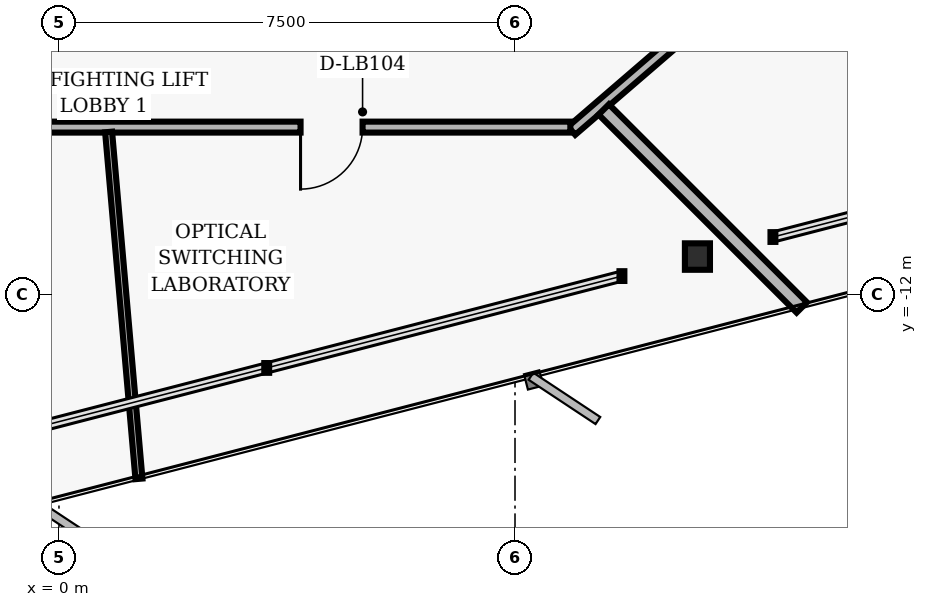
"""IFC4 building model, lengths in metres.
Left out: names, types, materials, properties, quantities, classifications, styles, units other than length and angle.
Written with IfcOpenShell. Run it as: python <this file> out.ifc"""

import sys

from ifc_helpers import new_model, si_unit, direction, frame, frame_2d, origin, origin_2d, place, context, subcontext, project, spatial, rectangle, i_section, extrude, element, fill, save


model = new_model("IFC4")
c1 = context("Model", 3, precision=1e-05, world=origin(), true_north=direction((0.0, 1.0)))
c2 = subcontext(c1, "Body", "Model", "MODEL_VIEW")
j1 = project(units=[si_unit("LENGTHUNIT", "METRE"), si_unit("PLANEANGLEUNIT", "RADIAN")], contexts=[c1])
p1 = place(None, origin())
s1 = spatial("IfcSite", under=j1, at=p1, CompositionType="ELEMENT")
p2 = place(p1, origin())
s2 = spatial("IfcBuilding", under=s1, at=p2, CompositionType="ELEMENT")
p3 = place(p2, frame((0.0, 0.0, 94.72)))
s3 = spatial("IfcBuildingStorey", under=s2, at=p3, CompositionType="ELEMENT", Elevation=94.72)
p4 = place(p3, frame((10.5, -11.379, 0.0), z_axis=(0.0, 0.0, 1.0), x_axis=(1.0, 0.0, 0.0)))
e1 = element("IfcColumn", 1, at=p4, inside=s3, PredefinedType="COLUMN", context=c2, shape_type="SweptSolid", body=[
    extrude(i_section(OverallWidth=0.412, OverallDepth=0.435, WebThickness=0.036, FlangeThickness=0.057, FilletRadius=0.022, at=origin_2d()), origin(), (0.0, 0.0, 1.0), 3.04),
])
p5 = place(p3, frame((13.268, -5.141, 0.0), z_axis=(0.0, 0.0, 1.0), x_axis=(-0.757534501725, -0.65279512766, 0.0)))
e2 = element("IfcWall", 2, at=p5, inside=s3, PredefinedType="PARTITIONING", context=c2, shape_type="SweptSolid", body=[
    extrude(rectangle(XDim=6.385, YDim=0.18, at=frame_2d((3.192, 0.0))), origin(), (0.0, 0.0, 1.0), 2.763),
])
p6 = place(p5, frame((2.418, 0.0, 0.0)))
e3 = element("IfcOpeningElement", 3, at=p6, cuts=e2, PredefinedType="OPENING", context=c2, shape_type="SweptSolid", body=[
    extrude(rectangle(XDim=1.18, YDim=2.02, at=frame_2d((0.59, 1.01))), frame((0.0, 0.1, 0.0), z_axis=(0.0, -1.0, 0.0), x_axis=(1.0, 0.0, 0.0)), (0.0, 0.0, 1.0), 0.2),
])
p7 = place(p3, frame((8.41, -9.25, 0.0), z_axis=(0.0, 0.0, 1.0), x_axis=(-1.0, 0.0, 0.0)))
e4 = element("IfcWall", 4, at=p7, inside=s3, PredefinedType="PARTITIONING", context=c2, shape_type="SweptSolid", body=[
    extrude(rectangle(XDim=17.0, YDim=0.18, at=frame_2d((8.5, 0.0))), origin(), (0.0, 0.0, 1.0), 2.277),
])
p8 = place(p7, frame((10.795, 0.0, 0.0)))
e5 = element("IfcOpeningElement", 5, at=p8, cuts=e4, PredefinedType="OPENING", context=c2, shape_type="SweptSolid", body=[
    extrude(rectangle(XDim=0.96, YDim=2.02, at=frame_2d((0.48, 1.01))), frame((0.0, 0.1, 0.0), z_axis=(0.0, -1.0, 0.0), x_axis=(1.0, 0.0, 0.0)), (0.0, 0.0, 1.0), 0.2),
])
p9 = place(p7, frame((3.417, 0.0, 0.0)))
e6 = element("IfcOpeningElement", 6, at=p9, cuts=e4, PredefinedType="OPENING", context=c2, shape_type="SweptSolid", body=[
    extrude(rectangle(XDim=1.02, YDim=2.02, at=frame_2d((0.51, 1.01))), frame((0.0, 0.1, 0.0), z_axis=(0.0, -1.0, 0.0), x_axis=(1.0, 0.0, 0.0)), (0.0, 0.0, 1.0), 0.2),
])
p10 = place(p3, frame((0.816, -9.33, 0.0), z_axis=(0.0, 0.0, 1.0), x_axis=(0.087137335428, -0.996196308352, 0.0)))
e7 = element("IfcWall", 7, at=p10, inside=s3, PredefinedType="MOVABLE", context=c2, shape_type="SweptSolid", body=[
    extrude(rectangle(XDim=5.727, YDim=0.115, at=frame_2d((2.863, 0.0))), origin(), (0.0, 0.0, 1.0), 2.763),
])
p11 = place(p3, frame((8.96, -8.96, 0.0), z_axis=(0.0, 0.0, 1.0), x_axis=(0.707106781187, -0.707106781187, 0.0)))
e8 = element("IfcWall", 8, at=p11, inside=s3, PredefinedType="PARTITIONING", context=c2, shape_type="SweptSolid", body=[
    extrude(rectangle(XDim=4.605, YDim=0.24, at=frame_2d((2.303, 0.0))), origin(), (0.0, 0.0, 1.0), 2.763),
])
p12 = place(p9, origin())
e9 = element("IfcDoor", 9, at=p12, inside=s3, OperationType="SINGLE_SWING_RIGHT", PredefinedType="DOOR", context=c2, shape_type="SweptSolid", body=[
    extrude(rectangle(XDim=1.02, YDim=2.02, at=frame_2d((0.51, 1.01))), frame((0.0, 0.025, 0.0), z_axis=(0.0, -1.0, 0.0), x_axis=(1.0, 0.0, 0.0)), (0.0, 0.0, 1.0), 0.05),
])
fill(e6, e9)
save(model, sys.argv[1])
